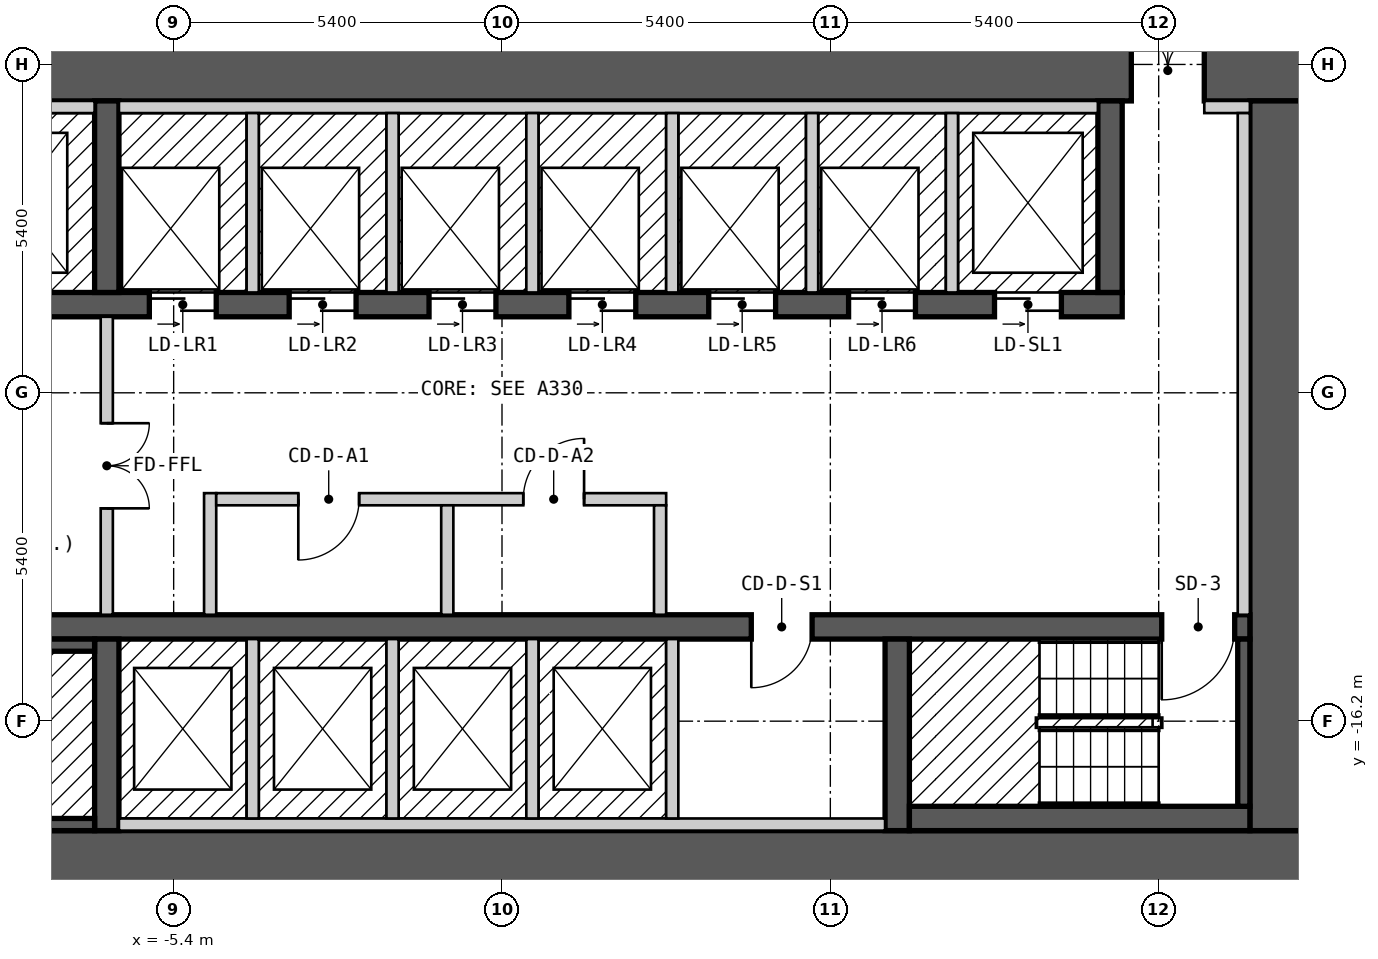
"""IFC4 building model, lengths in metres.
Left out: names, types, materials, properties, quantities, classifications, styles, units other than length and angle.
Written with IfcOpenShell. Run it as: python <this file> out.ifc"""

import sys

from ifc_helpers import new_model, si_unit, direction, frame, frame_2d, origin, place, context, subcontext, project, spatial, rectangle, extrude, element, fill, save


model = new_model("IFC4")
c1 = context("Model", 3, precision=1e-05, world=origin(), true_north=direction((0.0, 1.0)))
c2 = subcontext(c1, "Body", "Model", "MODEL_VIEW")
j1 = project(units=[si_unit("LENGTHUNIT", "METRE"), si_unit("PLANEANGLEUNIT", "RADIAN")], contexts=[c1])
p1 = place(None, origin())
s1 = spatial("IfcSite", under=j1, at=p1, CompositionType="ELEMENT")
p2 = place(p1, origin())
s2 = spatial("IfcBuilding", under=s1, at=p2, CompositionType="ELEMENT")
p3 = place(p2, frame((0.0, 0.0, 105.0)))
s3 = spatial("IfcBuildingStorey", under=s2, at=p3, CompositionType="ELEMENT", Elevation=105.0)
p4 = place(p3, frame((-13.3, -18.5, 0.0), z_axis=(0.0, 0.0, 1.0), x_axis=(1.0, 0.0, 0.0)))
e1 = element("IfcWall", 1, at=p4, inside=s3, PredefinedType="SHEAR", context=c2, shape_type="SweptSolid", body=[
    extrude(rectangle(XDim=26.6, YDim=1.0, at=frame_2d((13.3, 0.0))), origin(), (0.0, 0.0, 1.0), 2.6),
])
p5 = place(p3, frame((-13.3, -5.5, 0.0), z_axis=(0.0, 0.0, 1.0), x_axis=(1.0, 0.0, 0.0)))
e2 = element("IfcWall", 2, at=p5, inside=s3, PredefinedType="SHEAR", context=c2, shape_type="SweptSolid", body=[
    extrude(rectangle(XDim=26.6, YDim=1.0, at=frame_2d((13.3, 0.0))), origin(), (0.0, 0.0, 1.0), 2.6),
])
p6 = place(p5, frame((23.65, 0.0, 0.0)))
e3 = element("IfcOpeningElement", 3, at=p6, cuts=e2, PredefinedType="OPENING", context=c2, shape_type="SweptSolid", body=[
    extrude(rectangle(XDim=1.2, YDim=2.1, at=frame_2d((0.6, 1.05))), frame((0.0, 0.51, 0.0), z_axis=(0.0, -1.0, 0.0), x_axis=(1.0, 0.0, 0.0)), (0.0, 0.0, 1.0), 1.02),
])
p7 = place(p3, frame((12.8, -18.0, 0.0), z_axis=(0.0, 0.0, 1.0), x_axis=(0.0, 1.0, 0.0)))
e4 = element("IfcWall", 4, at=p7, inside=s3, PredefinedType="SHEAR", context=c2, shape_type="SweptSolid", body=[
    extrude(rectangle(XDim=12.0, YDim=1.0, at=frame_2d((6.0, 0.0))), origin(), (0.0, 0.0, 1.0), 2.6),
])
p8 = place(p3, frame((-12.3, -14.65, 0.0), z_axis=(0.0, 0.0, 1.0), x_axis=(1.0, 0.0, 0.0)))
e5 = element("IfcWall", 5, at=p8, inside=s3, PredefinedType="SHEAR", context=c2, shape_type="SweptSolid", body=[
    extrude(rectangle(XDim=24.6, YDim=0.4, at=frame_2d((12.3, 0.0))), origin(), (0.0, 0.0, 1.0), 2.6),
])
p9 = place(p8, frame((1.5, 0.0, 0.0), z_axis=(0.0, 0.0, 1.0), x_axis=(-1.0, 0.0, 0.0)))
e6 = element("IfcOpeningElement", 6, at=p9, cuts=e5, PredefinedType="OPENING", context=c2, shape_type="SweptSolid", body=[
    extrude(rectangle(XDim=1.2, YDim=2.1, at=frame_2d((0.6, 1.05))), frame((0.0, 0.21, 0.0), z_axis=(0.0, -1.0, 0.0), x_axis=(1.0, 0.0, 0.0)), (0.0, 0.0, 1.0), 0.42),
])
p10 = place(p8, frame((24.35, 0.0, 0.0), z_axis=(0.0, 0.0, 1.0), x_axis=(-1.0, 0.0, 0.0)))
e7 = element("IfcOpeningElement", 7, at=p10, cuts=e5, PredefinedType="OPENING", context=c2, shape_type="SweptSolid", body=[
    extrude(rectangle(XDim=1.2, YDim=2.1, at=frame_2d((0.6, 1.05))), frame((0.0, 0.21, 0.0), z_axis=(0.0, -1.0, 0.0), x_axis=(1.0, 0.0, 0.0)), (0.0, 0.0, 1.0), 0.42),
])
p11 = place(p8, frame((17.4, 0.0, 0.0), z_axis=(0.0, 0.0, 1.0), x_axis=(-1.0, 0.0, 0.0)))
e8 = element("IfcOpeningElement", 8, at=p11, cuts=e5, PredefinedType="OPENING", context=c2, shape_type="SweptSolid", body=[
    extrude(rectangle(XDim=1.0, YDim=2.1, at=frame_2d((0.5, 1.05))), frame((0.0, 0.21, 0.0), z_axis=(0.0, -1.0, 0.0), x_axis=(1.0, 0.0, 0.0)), (0.0, 0.0, 1.0), 0.42),
])
p12 = place(p3, frame((-12.3, -9.35, 0.0), z_axis=(0.0, 0.0, 1.0), x_axis=(1.0, 0.0, 0.0)))
e9 = element("IfcWall", 9, at=p12, inside=s3, PredefinedType="SHEAR", context=c2, shape_type="SweptSolid", body=[
    extrude(rectangle(XDim=22.5, YDim=0.4, at=frame_2d((11.25, 0.0))), origin(), (0.0, 0.0, 1.0), 2.6),
])
p13 = place(p12, frame((0.9, 0.0, 0.0)))
e10 = element("IfcOpeningElement", 10, at=p13, cuts=e9, PredefinedType="OPENING", context=c2, shape_type="SweptSolid", body=[
    extrude(rectangle(XDim=1.1, YDim=2.1, at=frame_2d((0.55, 1.05))), frame((0.0, 0.21, 0.0), z_axis=(0.0, -1.0, 0.0), x_axis=(1.0, 0.0, 0.0)), (0.0, 0.0, 1.0), 0.42),
])
p14 = place(p12, frame((3.7, 0.0, 0.0)))
e11 = element("IfcOpeningElement", 11, at=p14, cuts=e9, PredefinedType="OPENING", context=c2, shape_type="SweptSolid", body=[
    extrude(rectangle(XDim=1.1, YDim=2.1, at=frame_2d((0.55, 1.05))), frame((0.0, 0.21, 0.0), z_axis=(0.0, -1.0, 0.0), x_axis=(1.0, 0.0, 0.0)), (0.0, 0.0, 1.0), 0.42),
])
p15 = place(p12, frame((6.5, 0.0, 0.0)))
e12 = element("IfcOpeningElement", 12, at=p15, cuts=e9, PredefinedType="OPENING", context=c2, shape_type="SweptSolid", body=[
    extrude(rectangle(XDim=1.1, YDim=2.1, at=frame_2d((0.55, 1.05))), frame((0.0, 0.21, 0.0), z_axis=(0.0, -1.0, 0.0), x_axis=(1.0, 0.0, 0.0)), (0.0, 0.0, 1.0), 0.42),
])
p16 = place(p12, frame((8.8, 0.0, 0.0)))
e13 = element("IfcOpeningElement", 13, at=p16, cuts=e9, PredefinedType="OPENING", context=c2, shape_type="SweptSolid", body=[
    extrude(rectangle(XDim=1.1, YDim=2.1, at=frame_2d((0.55, 1.05))), frame((0.0, 0.21, 0.0), z_axis=(0.0, -1.0, 0.0), x_axis=(1.0, 0.0, 0.0)), (0.0, 0.0, 1.0), 0.42),
])
p17 = place(p12, frame((11.1, 0.0, 0.0)))
e14 = element("IfcOpeningElement", 14, at=p17, cuts=e9, PredefinedType="OPENING", context=c2, shape_type="SweptSolid", body=[
    extrude(rectangle(XDim=1.1, YDim=2.1, at=frame_2d((0.55, 1.05))), frame((0.0, 0.21, 0.0), z_axis=(0.0, -1.0, 0.0), x_axis=(1.0, 0.0, 0.0)), (0.0, 0.0, 1.0), 0.42),
])
p18 = place(p12, frame((13.4, 0.0, 0.0)))
e15 = element("IfcOpeningElement", 15, at=p18, cuts=e9, PredefinedType="OPENING", context=c2, shape_type="SweptSolid", body=[
    extrude(rectangle(XDim=1.1, YDim=2.1, at=frame_2d((0.55, 1.05))), frame((0.0, 0.21, 0.0), z_axis=(0.0, -1.0, 0.0), x_axis=(1.0, 0.0, 0.0)), (0.0, 0.0, 1.0), 0.42),
])
p19 = place(p12, frame((15.7, 0.0, 0.0)))
e16 = element("IfcOpeningElement", 16, at=p19, cuts=e9, PredefinedType="OPENING", context=c2, shape_type="SweptSolid", body=[
    extrude(rectangle(XDim=1.1, YDim=2.1, at=frame_2d((0.55, 1.05))), frame((0.0, 0.21, 0.0), z_axis=(0.0, -1.0, 0.0), x_axis=(1.0, 0.0, 0.0)), (0.0, 0.0, 1.0), 0.42),
])
p20 = place(p12, frame((18.0, 0.0, 0.0)))
e17 = element("IfcOpeningElement", 17, at=p20, cuts=e9, PredefinedType="OPENING", context=c2, shape_type="SweptSolid", body=[
    extrude(rectangle(XDim=1.1, YDim=2.1, at=frame_2d((0.55, 1.05))), frame((0.0, 0.21, 0.0), z_axis=(0.0, -1.0, 0.0), x_axis=(1.0, 0.0, 0.0)), (0.0, 0.0, 1.0), 0.42),
])
p21 = place(p12, frame((20.4, 0.0, 0.0)))
e18 = element("IfcOpeningElement", 18, at=p21, cuts=e9, PredefinedType="OPENING", context=c2, shape_type="SweptSolid", body=[
    extrude(rectangle(XDim=1.1, YDim=2.1, at=frame_2d((0.55, 1.05))), frame((0.0, 0.21, 0.0), z_axis=(0.0, -1.0, 0.0), x_axis=(1.0, 0.0, 0.0)), (0.0, 0.0, 1.0), 0.42),
])
for number, where, z_axis, x_axis in (
    (19, (-6.5, -18.0, 0.0), (0.0, 0.0, 1.0), (0.0, 1.0, 0.0)),
    (20, (6.5, -18.0, 0.0), (0.0, 0.0, 1.0), (0.0, 1.0, 0.0)),
    (21, (-6.5, -9.15, 0.0), (0.0, 0.0, 1.0), (0.0, 1.0, 0.0)),
    (22, (10.0, -9.15, 0.0), (0.0, 0.0, 1.0), (0.0, 1.0, 0.0)),
):
    element("IfcWall", number, at=place(p3, frame(where, z_axis=z_axis, x_axis=x_axis)), inside=s3, PredefinedType="SHEAR", context=c2, shape_type="SweptSolid", body=[
        extrude(rectangle(XDim=3.15, YDim=0.4, at=frame_2d((1.575, 0.0))), origin(), (0.0, 0.0, 1.0), 2.6),
    ])
for number, where, z_axis, x_axis in (
    (23, (-12.1, -17.9, 0.0), (0.0, 0.0, 1.0), (1.0, 0.0, 0.0)),
    (24, (-12.1, -6.1, 0.0), (0.0, 0.0, 1.0), (1.0, 0.0, 0.0)),
):
    element("IfcWall", number, at=place(p3, frame(where, z_axis=z_axis, x_axis=x_axis)), inside=s3, PredefinedType="SOLIDWALL", context=c2, shape_type="SweptSolid", body=[
        extrude(rectangle(XDim=5.4, YDim=0.2, at=frame_2d((2.7, 0.0))), origin(), (0.0, 0.0, 1.0), 2.6),
    ])
p22 = place(p3, frame((-10.8, -14.95, 0.0), z_axis=(0.0, 0.0, 1.0), x_axis=(1.0, 0.0, 0.0)))
e25 = element("IfcWall", 25, at=p22, inside=s3, PredefinedType="SOLIDWALL", context=c2, shape_type="SweptSolid", body=[
    extrude(rectangle(XDim=4.1, YDim=0.2, at=frame_2d((2.05, 0.0))), origin(), (0.0, 0.0, 1.0), 2.6),
])
p23 = place(p3, frame((-6.5, -14.45, 0.0), z_axis=(0.0, 0.0, 1.0), x_axis=(0.0, 1.0, 0.0)))
e26 = element("IfcWall", 26, at=p23, inside=s3, PredefinedType="PARTITIONING", context=c2, shape_type="SweptSolid", body=[
    extrude(rectangle(XDim=4.9, YDim=0.2, at=frame_2d((2.45, 0.0))), origin(), (0.0, 0.0, 1.0), 2.6),
])
p24 = place(p23, frame((3.15, 0.0, 0.0), z_axis=(0.0, 0.0, 1.0), x_axis=(-1.0, 0.0, 0.0)))
e27 = element("IfcOpeningElement", 27, at=p24, cuts=e26, PredefinedType="OPENING", context=c2, shape_type="SweptSolid", body=[
    extrude(rectangle(XDim=1.4, YDim=2.1, at=frame_2d((0.7, 1.05))), frame((0.0, 0.11, 0.0), z_axis=(0.0, -1.0, 0.0), x_axis=(1.0, 0.0, 0.0)), (0.0, 0.0, 1.0), 0.22),
])
p25 = place(p3, frame((-6.3, -17.9, 0.0), z_axis=(0.0, 0.0, 1.0), x_axis=(1.0, 0.0, 0.0)))
e28 = element("IfcWall", 28, at=p25, inside=s3, PredefinedType="SOLIDWALL", context=c2, shape_type="SweptSolid", body=[
    extrude(rectangle(XDim=12.6, YDim=0.2, at=frame_2d((6.3, 0.0))), origin(), (0.0, 0.0, 1.0), 2.6),
])
p26 = place(p3, frame((-6.3, -6.1, 0.0), z_axis=(0.0, 0.0, 1.0), x_axis=(1.0, 0.0, 0.0)))
e29 = element("IfcWall", 29, at=p26, inside=s3, PredefinedType="SOLIDWALL", context=c2, shape_type="SweptSolid", body=[
    extrude(rectangle(XDim=16.1, YDim=0.2, at=frame_2d((8.05, 0.0))), origin(), (0.0, 0.0, 1.0), 2.6),
])
p27 = place(p3, frame((-4.8, -14.45, 0.0), z_axis=(0.0, 0.0, 1.0), x_axis=(0.0, 1.0, 0.0)))
e30 = element("IfcWall", 30, at=p27, inside=s3, PredefinedType="PARTITIONING", context=c2, shape_type="SweptSolid", body=[
    extrude(rectangle(XDim=2.0, YDim=0.2, at=frame_2d((1.0, 0.0))), origin(), (0.0, 0.0, 1.0), 2.6),
])
p28 = place(p3, frame((-4.7, -12.55, 0.0), z_axis=(0.0, 0.0, 1.0), x_axis=(1.0, 0.0, 0.0)))
e31 = element("IfcWall", 31, at=p28, inside=s3, PredefinedType="PARTITIONING", context=c2, shape_type="SweptSolid", body=[
    extrude(rectangle(XDim=7.4, YDim=0.2, at=frame_2d((3.7, 0.0))), origin(), (0.0, 0.0, 1.0), 2.6),
])
p29 = place(p28, frame((2.35, 0.0, 0.0), z_axis=(0.0, 0.0, 1.0), x_axis=(-1.0, 0.0, 0.0)))
e32 = element("IfcOpeningElement", 32, at=p29, cuts=e31, PredefinedType="OPENING", context=c2, shape_type="SweptSolid", body=[
    extrude(rectangle(XDim=1.0, YDim=2.1, at=frame_2d((0.5, 1.05))), frame((0.0, 0.11, 0.0), z_axis=(0.0, -1.0, 0.0), x_axis=(1.0, 0.0, 0.0)), (0.0, 0.0, 1.0), 0.22),
])
p30 = place(p28, frame((6.05, 0.0, 0.0), z_axis=(0.0, 0.0, 1.0), x_axis=(-1.0, 0.0, 0.0)))
e33 = element("IfcOpeningElement", 33, at=p30, cuts=e31, PredefinedType="OPENING", context=c2, shape_type="SweptSolid", body=[
    extrude(rectangle(XDim=1.0, YDim=2.1, at=frame_2d((0.5, 1.05))), frame((0.0, 0.11, 0.0), z_axis=(0.0, -1.0, 0.0), x_axis=(1.0, 0.0, 0.0)), (0.0, 0.0, 1.0), 0.22),
])
for number, where, z_axis, x_axis in (
    (34, (-4.1, -17.8, 0.0), (0.0, 0.0, 1.0), (0.0, 1.0, 0.0)),
    (35, (-4.1, -9.15, 0.0), (0.0, 0.0, 1.0), (0.0, 1.0, 0.0)),
    (36, (-1.8, -17.8, 0.0), (0.0, 0.0, 1.0), (0.0, 1.0, 0.0)),
    (37, (-1.8, -9.15, 0.0), (0.0, 0.0, 1.0), (0.0, 1.0, 0.0)),
):
    element("IfcWall", number, at=place(p3, frame(where, z_axis=z_axis, x_axis=x_axis)), inside=s3, PredefinedType="SOLIDWALL", context=c2, shape_type="SweptSolid", body=[
        extrude(rectangle(XDim=2.95, YDim=0.2, at=frame_2d((1.475, 0.0))), origin(), (0.0, 0.0, 1.0), 2.6),
    ])
p31 = place(p3, frame((-0.9, -14.45, 0.0), z_axis=(0.0, 0.0, 1.0), x_axis=(0.0, 1.0, 0.0)))
e38 = element("IfcWall", 38, at=p31, inside=s3, PredefinedType="PARTITIONING", context=c2, shape_type="SweptSolid", body=[
    extrude(rectangle(XDim=1.8, YDim=0.2, at=frame_2d((0.9, 0.0))), origin(), (0.0, 0.0, 1.0), 2.6),
])
for number, where, z_axis, x_axis in (
    (39, (0.5, -17.8, 0.0), (0.0, 0.0, 1.0), (0.0, 1.0, 0.0)),
    (40, (0.5, -9.15, 0.0), (0.0, 0.0, 1.0), (0.0, 1.0, 0.0)),
):
    element("IfcWall", number, at=place(p3, frame(where, z_axis=z_axis, x_axis=x_axis)), inside=s3, PredefinedType="SOLIDWALL", context=c2, shape_type="SweptSolid", body=[
        extrude(rectangle(XDim=2.95, YDim=0.2, at=frame_2d((1.475, 0.0))), origin(), (0.0, 0.0, 1.0), 2.6),
    ])
p32 = place(p3, frame((2.6, -14.45, 0.0), z_axis=(0.0, 0.0, 1.0), x_axis=(0.0, 1.0, 0.0)))
e41 = element("IfcWall", 41, at=p32, inside=s3, PredefinedType="PARTITIONING", context=c2, shape_type="SweptSolid", body=[
    extrude(rectangle(XDim=1.8, YDim=0.2, at=frame_2d((0.9, 0.0))), origin(), (0.0, 0.0, 1.0), 2.6),
])
for number, where, z_axis, x_axis in (
    (42, (2.8, -17.8, 0.0), (0.0, 0.0, 1.0), (0.0, 1.0, 0.0)),
    (43, (2.8, -9.15, 0.0), (0.0, 0.0, 1.0), (0.0, 1.0, 0.0)),
    (44, (5.1, -9.15, 0.0), (0.0, 0.0, 1.0), (0.0, 1.0, 0.0)),
):
    element("IfcWall", number, at=place(p3, frame(where, z_axis=z_axis, x_axis=x_axis)), inside=s3, PredefinedType="SOLIDWALL", context=c2, shape_type="SweptSolid", body=[
        extrude(rectangle(XDim=2.95, YDim=0.2, at=frame_2d((1.475, 0.0))), origin(), (0.0, 0.0, 1.0), 2.6),
    ])
p33 = place(p3, frame((6.7, -17.8, 0.0), z_axis=(0.0, 0.0, 1.0), x_axis=(1.0, 0.0, 0.0)))
e45 = element("IfcWall", 45, at=p33, inside=s3, PredefinedType="SOLIDWALL", context=c2, shape_type="SweptSolid", body=[
    extrude(rectangle(XDim=5.6, YDim=0.4, at=frame_2d((2.8, 0.0))), origin(), (0.0, 0.0, 1.0), 2.6),
])
p34 = place(p3, frame((7.4, -9.15, 0.0), z_axis=(0.0, 0.0, 1.0), x_axis=(0.0, 1.0, 0.0)))
e46 = element("IfcWall", 46, at=p34, inside=s3, PredefinedType="SOLIDWALL", context=c2, shape_type="SweptSolid", body=[
    extrude(rectangle(XDim=2.95, YDim=0.2, at=frame_2d((1.475, 0.0))), origin(), (0.0, 0.0, 1.0), 2.6),
])
p35 = place(p3, frame((11.55, -6.1, 0.0), z_axis=(0.0, 0.0, 1.0), x_axis=(1.0, 0.0, 0.0)))
e47 = element("IfcWall", 47, at=p35, inside=s3, PredefinedType="PARTITIONING", context=c2, shape_type="SweptSolid", body=[
    extrude(rectangle(XDim=0.75, YDim=0.2, at=frame_2d((0.375, 0.0))), origin(), (0.0, 0.0, 1.0), 2.6),
])
p36 = place(p3, frame((12.2, -17.6, 0.0), z_axis=(0.0, 0.0, 1.0), x_axis=(0.0, 1.0, 0.0)))
e48 = element("IfcWall", 48, at=p36, inside=s3, PredefinedType="SOLIDWALL", context=c2, shape_type="SweptSolid", body=[
    extrude(rectangle(XDim=2.75, YDim=0.2, at=frame_2d((1.375, 0.0))), origin(), (0.0, 0.0, 1.0), 2.6),
])
p37 = place(p3, frame((12.2, -14.45, 0.0), z_axis=(0.0, 0.0, 1.0), x_axis=(0.0, 1.0, 0.0)))
e49 = element("IfcWall", 49, at=p37, inside=s3, PredefinedType="PARTITIONING", context=c2, shape_type="SweptSolid", body=[
    extrude(rectangle(XDim=8.25, YDim=0.2, at=frame_2d((4.125, 0.0))), origin(), (0.0, 0.0, 1.0), 2.6),
])
p38 = place(p15, origin())
e50 = element("IfcDoor", 50, at=p38, inside=s3, OperationType="DOUBLE_DOOR_SLIDING", PredefinedType="DOOR", context=c2, shape_type="SweptSolid", body=[
    extrude(rectangle(XDim=1.1, YDim=2.1, at=frame_2d((0.55, 1.05))), frame((0.0, 0.025, 0.0), z_axis=(0.0, -1.0, 0.0), x_axis=(1.0, 0.0, 0.0)), (0.0, 0.0, 1.0), 0.05),
])
fill(e12, e50)
p39 = place(p16, origin())
e51 = element("IfcDoor", 51, at=p39, inside=s3, OperationType="DOUBLE_DOOR_SLIDING", PredefinedType="DOOR", context=c2, shape_type="SweptSolid", body=[
    extrude(rectangle(XDim=1.1, YDim=2.1, at=frame_2d((0.55, 1.05))), frame((0.0, 0.025, 0.0), z_axis=(0.0, -1.0, 0.0), x_axis=(1.0, 0.0, 0.0)), (0.0, 0.0, 1.0), 0.05),
])
fill(e13, e51)
p40 = place(p17, origin())
e52 = element("IfcDoor", 52, at=p40, inside=s3, OperationType="DOUBLE_DOOR_SLIDING", PredefinedType="DOOR", context=c2, shape_type="SweptSolid", body=[
    extrude(rectangle(XDim=1.1, YDim=2.1, at=frame_2d((0.55, 1.05))), frame((0.0, 0.025, 0.0), z_axis=(0.0, -1.0, 0.0), x_axis=(1.0, 0.0, 0.0)), (0.0, 0.0, 1.0), 0.05),
])
fill(e14, e52)
p41 = place(p18, origin())
e53 = element("IfcDoor", 53, at=p41, inside=s3, OperationType="DOUBLE_DOOR_SLIDING", PredefinedType="DOOR", context=c2, shape_type="SweptSolid", body=[
    extrude(rectangle(XDim=1.1, YDim=2.1, at=frame_2d((0.55, 1.05))), frame((0.0, 0.025, 0.0), z_axis=(0.0, -1.0, 0.0), x_axis=(1.0, 0.0, 0.0)), (0.0, 0.0, 1.0), 0.05),
])
fill(e15, e53)
p42 = place(p19, origin())
e54 = element("IfcDoor", 54, at=p42, inside=s3, OperationType="DOUBLE_DOOR_SLIDING", PredefinedType="DOOR", context=c2, shape_type="SweptSolid", body=[
    extrude(rectangle(XDim=1.1, YDim=2.1, at=frame_2d((0.55, 1.05))), frame((0.0, 0.025, 0.0), z_axis=(0.0, -1.0, 0.0), x_axis=(1.0, 0.0, 0.0)), (0.0, 0.0, 1.0), 0.05),
])
fill(e16, e54)
p43 = place(p20, origin())
e55 = element("IfcDoor", 55, at=p43, inside=s3, OperationType="DOUBLE_DOOR_SLIDING", PredefinedType="DOOR", context=c2, shape_type="SweptSolid", body=[
    extrude(rectangle(XDim=1.1, YDim=2.1, at=frame_2d((0.55, 1.05))), frame((0.0, 0.025, 0.0), z_axis=(0.0, -1.0, 0.0), x_axis=(1.0, 0.0, 0.0)), (0.0, 0.0, 1.0), 0.05),
])
fill(e17, e55)
p44 = place(p21, origin())
e56 = element("IfcDoor", 56, at=p44, inside=s3, OperationType="DOUBLE_DOOR_SLIDING", PredefinedType="DOOR", context=c2, shape_type="SweptSolid", body=[
    extrude(rectangle(XDim=1.1, YDim=2.1, at=frame_2d((0.55, 1.05))), frame((0.0, 0.025, 0.0), z_axis=(0.0, -1.0, 0.0), x_axis=(1.0, 0.0, 0.0)), (0.0, 0.0, 1.0), 0.05),
])
fill(e18, e56)
p45 = place(p10, origin())
e57 = element("IfcDoor", 57, at=p45, inside=s3, OperationType="SINGLE_SWING_RIGHT", PredefinedType="DOOR", context=c2, shape_type="SweptSolid", body=[
    extrude(rectangle(XDim=1.2, YDim=2.1, at=frame_2d((0.6, 1.05))), frame((0.0, 0.025, 0.0), z_axis=(0.0, -1.0, 0.0), x_axis=(1.0, 0.0, 0.0)), (0.0, 0.0, 1.0), 0.05),
])
fill(e7, e57)
p46 = place(p24, origin())
e58 = element("IfcDoor", 58, at=p46, inside=s3, OperationType="DOUBLE_DOOR_SINGLE_SWING", PredefinedType="DOOR", context=c2, shape_type="SweptSolid", body=[
    extrude(rectangle(XDim=1.4, YDim=2.1, at=frame_2d((0.7, 1.05))), frame((0.0, 0.025, 0.0), z_axis=(0.0, -1.0, 0.0), x_axis=(1.0, 0.0, 0.0)), (0.0, 0.0, 1.0), 0.05),
])
fill(e27, e58)
p47 = place(p6, origin())
e59 = element("IfcDoor", 59, at=p47, inside=s3, OperationType="DOUBLE_DOOR_SINGLE_SWING", PredefinedType="DOOR", context=c2, shape_type="SweptSolid", body=[
    extrude(rectangle(XDim=1.2, YDim=2.1, at=frame_2d((0.6, 1.05))), frame((0.0, 0.025, 0.0), z_axis=(0.0, -1.0, 0.0), x_axis=(1.0, 0.0, 0.0)), (0.0, 0.0, 1.0), 0.05),
])
fill(e3, e59)
p48 = place(p29, origin())
e60 = element("IfcDoor", 60, at=p48, inside=s3, OperationType="SINGLE_SWING_RIGHT", PredefinedType="DOOR", context=c2, shape_type="SweptSolid", body=[
    extrude(rectangle(XDim=1.0, YDim=2.1, at=frame_2d((0.5, 1.05))), frame((0.0, 0.025, 0.0), z_axis=(0.0, -1.0, 0.0), x_axis=(1.0, 0.0, 0.0)), (0.0, 0.0, 1.0), 0.05),
])
fill(e32, e60)
p49 = place(p30, origin())
e61 = element("IfcDoor", 61, at=p49, inside=s3, OperationType="SINGLE_SWING_LEFT", PredefinedType="DOOR", context=c2, shape_type="SweptSolid", body=[
    extrude(rectangle(XDim=1.0, YDim=2.1, at=frame_2d((0.5, 1.05))), frame((0.0, 0.025, 0.0), z_axis=(0.0, -1.0, 0.0), x_axis=(1.0, 0.0, 0.0)), (0.0, 0.0, 1.0), 0.05),
])
fill(e33, e61)
p50 = place(p11, origin())
e62 = element("IfcDoor", 62, at=p50, inside=s3, OperationType="SINGLE_SWING_RIGHT", PredefinedType="DOOR", context=c2, shape_type="SweptSolid", body=[
    extrude(rectangle(XDim=1.0, YDim=2.1, at=frame_2d((0.5, 1.05))), frame((0.0, 0.025, 0.0), z_axis=(0.0, -1.0, 0.0), x_axis=(1.0, 0.0, 0.0)), (0.0, 0.0, 1.0), 0.05),
])
fill(e8, e62)
save(model, sys.argv[1])
